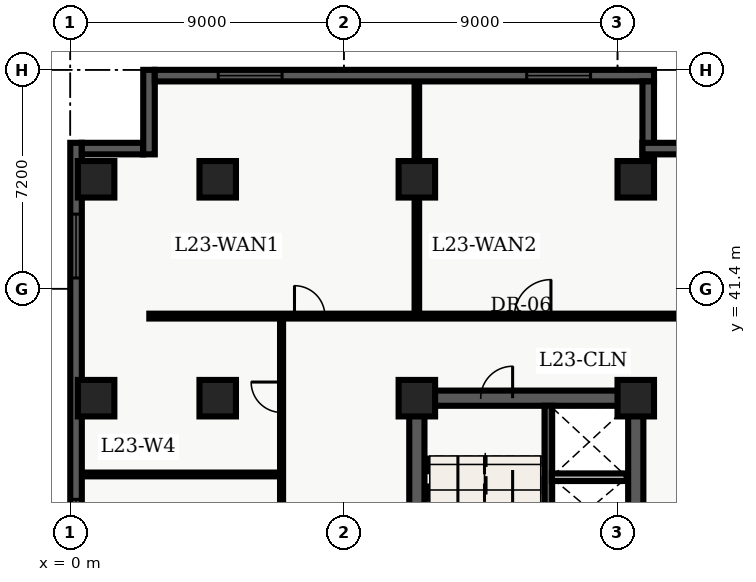
"""IFC4 building model, lengths in metres.
Left out: names, types, materials, properties, quantities, classifications, styles, units other than length and angle.
Written with IfcOpenShell. Run it as: python <this file> out.ifc"""

import sys

from ifc_helpers import new_model, entity, si_unit, converted_unit, direction, frame, origin_with_axes, origin_2d_with_axis, place, context, subcontext, project, spatial, polyline, rectangle, outline, extrude, element, fill, save


model = new_model("IFC4")
c1 = context("Model", 3, precision=1e-05, world=origin_with_axes(), true_north=direction((0.0, 1.0)))
c2 = subcontext(c1, "Body", "Model", "MODEL_VIEW")
j1 = project(units=[si_unit("LENGTHUNIT", "METRE"), converted_unit("PLANEANGLEUNIT", "DEGREE", entity("IfcPlaneAngleMeasure", 0.017), si_unit("PLANEANGLEUNIT", "RADIAN"), dimensions=[0, 0, 0, 0, 0, 0, 0])], contexts=[c1])
p1 = place(None, origin_with_axes())
s1 = spatial("IfcSite", under=j1, at=p1, CompositionType="ELEMENT")
p2 = place(p1, origin_with_axes())
s2 = spatial("IfcBuilding", under=s1, at=p2, CompositionType="ELEMENT")
p3 = place(p2, frame((0.0, 0.0, 96.9), z_axis=(0.0, 0.0, 1.0), x_axis=(1.0, 0.0, 0.0)))
s3 = spatial("IfcBuildingStorey", under=s2, at=p3, CompositionType="ELEMENT", Elevation=96.9)
p4 = place(p3, frame((11.4, 10.8, 0.0), z_axis=(0.0, 0.0, 1.0), x_axis=(0.0, 1.0, 0.0)))
e1 = element("IfcWall", 1, at=p4, inside=s3, PredefinedType="SHEAR", context=c2, shape_type="SweptSolid", body=[
    extrude(outline(polyline([(0.0, -0.25), (27.0, -0.25), (27.0, 0.25), (0.0, 0.25), (0.0, -0.25)])), origin_with_axes(), (0.0, 0.0, 1.0), 3.66),
])
p5 = place(p3, frame((11.4, 37.8, 0.0), z_axis=(0.0, 0.0, 1.0), x_axis=(1.0, 0.0, 0.0)))
e2 = element("IfcWall", 2, at=p5, inside=s3, PredefinedType="SHEAR", context=c2, shape_type="SweptSolid", body=[
    extrude(outline(polyline([(0.0, -0.25), (7.2, -0.25), (7.2, 0.25), (0.0, 0.25), (0.0, -0.25)])), origin_with_axes(), (0.0, 0.0, 1.0), 3.66),
])
p6 = place(p5, frame((2.625, 0.0, 0.0), z_axis=(0.0, 0.0, 1.0), x_axis=(1.0, 0.0, 0.0)))
e3 = element("IfcOpeningElement", 3, at=p6, cuts=e2, PredefinedType="OPENING", context=c2, shape_type="SweptSolid", body=[
    extrude(rectangle(XDim=1.05, YDim=0.52, at=origin_2d_with_axis()), origin_with_axes(), (0.0, 0.0, 1.0), 2.15),
])
p7 = place(p3, frame((18.6, 24.3, 0.0), z_axis=(0.0, 0.0, 1.0), x_axis=(0.0, 1.0, 0.0)))
e4 = element("IfcWall", 4, at=p7, inside=s3, PredefinedType="SHEAR", context=c2, shape_type="SweptSolid", body=[
    extrude(outline(polyline([(0.0, -0.25), (13.5, -0.25), (13.5, 0.25), (0.0, 0.25), (0.0, -0.25)])), origin_with_axes(), (0.0, 0.0, 1.0), 3.66),
])
p8 = place(p7, frame((6.025, 0.0, 0.0), z_axis=(0.0, 0.0, 1.0), x_axis=(1.0, 0.0, 0.0)))
e5 = element("IfcOpeningElement", 5, at=p8, cuts=e4, PredefinedType="OPENING", context=c2, shape_type="SweptSolid", body=[
    extrude(rectangle(XDim=0.95, YDim=0.52, at=origin_2d_with_axis()), origin_with_axes(), (0.0, 0.0, 1.0), 2.15),
])
p9 = place(p7, frame((7.825, 0.0, 0.0), z_axis=(0.0, 0.0, 1.0), x_axis=(1.0, 0.0, 0.0)))
e6 = element("IfcOpeningElement", 6, at=p9, cuts=e4, PredefinedType="OPENING", context=c2, shape_type="SweptSolid", body=[
    extrude(rectangle(XDim=0.95, YDim=0.52, at=origin_2d_with_axis()), origin_with_axes(), (0.0, 0.0, 1.0), 2.15),
])
p10 = place(p3, frame((15.725, 28.9, 0.0), z_axis=(0.0, 0.0, 1.0), x_axis=(0.0, 1.0, 0.0)))
e7 = element("IfcWall", 7, at=p10, inside=s3, PredefinedType="SHEAR", context=c2, shape_type="SweptSolid", body=[
    extrude(outline(polyline([(0.0, -0.125), (8.65, -0.125), (8.65, 0.125), (0.0, 0.125), (0.0, -0.125)])), origin_with_axes(), (0.0, 0.0, 1.0), 3.66),
])
for number, where, z_axis, x_axis in (
    (8, (11.4, 37.8, 0.0), (0.0, 0.0, 1.0), (1.0, 0.0, 0.0)),
    (9, (11.4, 45.0, 0.0), (0.0, 0.0, 1.0), (1.0, 0.0, 0.0)),
    (10, (18.6, 37.8, 0.0), (0.0, 0.0, 1.0), (1.0, 0.0, 0.0)),
    (11, (18.6, 45.0, 0.0), (0.0, 0.0, 1.0), (1.0, 0.0, 0.0)),
    (12, (4.85, 37.8, 0.0), (0.0, 0.0, 1.0), (1.0, 0.0, 0.0)),
    (13, (4.85, 45.0, 0.0), (0.0, 0.0, 1.0), (1.0, 0.0, 0.0)),
    (14, (0.85, 37.8, 0.0), (0.0, 0.0, 1.0), (1.0, 0.0, 0.0)),
    (15, (0.85, 45.0, 0.0), (0.0, 0.0, 1.0), (1.0, 0.0, 0.0)),
):
    element("IfcColumn", number, at=place(p3, frame(where, z_axis=z_axis, x_axis=x_axis)), inside=s3, PredefinedType="COLUMN", context=c2, shape_type="SweptSolid", body=[
        extrude(rectangle(XDim=1.2, YDim=1.2, at=origin_2d_with_axis()), origin_with_axes(), (0.0, 0.0, 1.0), 3.9),
    ])
p11 = place(p3, frame((15.84, 35.2, 0.0), z_axis=(0.0, 0.0, 1.0), x_axis=(1.0, 0.0, 0.0)))
e16 = element("IfcWall", 16, at=p11, inside=s3, PredefinedType="SOLIDWALL", context=c2, shape_type="SweptSolid", body=[
    extrude(outline(polyline([(0.0, -0.125), (2.46, -0.125), (2.46, 0.125), (0.0, 0.125), (0.0, -0.125)])), origin_with_axes(), (0.0, 0.0, 1.0), 2.7),
])
p12 = place(p3, frame((2.6, 40.5, 0.0), z_axis=(0.0, 0.0, 1.0), x_axis=(1.0, 0.0, 0.0)))
e17 = element("IfcWall", 17, at=p12, inside=s3, PredefinedType="PARTITIONING", context=c2, shape_type="SweptSolid", body=[
    extrude(outline(polyline([(0.0, -0.08), (18.65, -0.08), (18.65, 0.08), (0.0, 0.08), (0.0, -0.08)])), origin_with_axes(), (0.0, 0.0, 1.0), 2.7),
])
p13 = place(p12, frame((5.275, 0.0, 0.0), z_axis=(0.0, 0.0, 1.0), x_axis=(1.0, 0.0, 0.0)))
e18 = element("IfcOpeningElement", 18, at=p13, cuts=e17, PredefinedType="OPENING", context=c2, shape_type="SweptSolid", body=[
    extrude(rectangle(XDim=1.0, YDim=0.18, at=origin_2d_with_axis()), origin_with_axes(), (0.0, 0.0, 1.0), 2.15),
])
p14 = place(p12, frame((12.61, 0.0, 0.0), z_axis=(0.0, 0.0, 1.0), x_axis=(1.0, 0.0, 0.0)))
e19 = element("IfcOpeningElement", 19, at=p14, cuts=e17, PredefinedType="OPENING", context=c2, shape_type="SweptSolid", body=[
    extrude(rectangle(XDim=1.2, YDim=0.18, at=origin_2d_with_axis()), origin_with_axes(), (0.0, 0.0, 1.0), 2.2),
])
p15 = place(p3, frame((6.95, 7.8, 0.0), z_axis=(0.0, 0.0, 1.0), x_axis=(0.0, 1.0, 0.0)))
e20 = element("IfcWall", 20, at=p15, inside=s3, PredefinedType="PARTITIONING", context=c2, shape_type="SweptSolid", body=[
    extrude(outline(polyline([(0.0, -0.05), (32.7, -0.05), (32.7, 0.05), (0.0, 0.05), (0.0, -0.05)])), origin_with_axes(), (0.0, 0.0, 1.0), 2.7),
])
p16 = place(p15, frame((3.707, 0.0, 0.0), z_axis=(0.0, 0.0, 1.0), x_axis=(1.0, 0.0, 0.0)))
e21 = element("IfcOpeningElement", 21, at=p16, cuts=e20, PredefinedType="OPENING", context=c2, shape_type="SweptSolid", body=[
    extrude(rectangle(XDim=1.0, YDim=0.12, at=origin_2d_with_axis()), origin_with_axes(), (0.0, 0.0, 1.0), 2.15),
])
p17 = place(p15, frame((11.836, 0.0, 0.0), z_axis=(0.0, 0.0, 1.0), x_axis=(1.0, 0.0, 0.0)))
e22 = element("IfcOpeningElement", 22, at=p17, cuts=e20, PredefinedType="OPENING", context=c2, shape_type="SweptSolid", body=[
    extrude(rectangle(XDim=1.0, YDim=0.12, at=origin_2d_with_axis()), origin_with_axes(), (0.0, 0.0, 1.0), 2.15),
])
p18 = place(p15, frame((21.94, 0.0, 0.0), z_axis=(0.0, 0.0, 1.0), x_axis=(1.0, 0.0, 0.0)))
e23 = element("IfcOpeningElement", 23, at=p18, cuts=e20, PredefinedType="OPENING", context=c2, shape_type="SweptSolid", body=[
    extrude(rectangle(XDim=1.0, YDim=0.12, at=origin_2d_with_axis()), origin_with_axes(), (0.0, 0.0, 1.0), 2.15),
])
p19 = place(p15, frame((30.03, 0.0, 0.0), z_axis=(0.0, 0.0, 1.0), x_axis=(1.0, 0.0, 0.0)))
e24 = element("IfcOpeningElement", 24, at=p19, cuts=e20, PredefinedType="OPENING", context=c2, shape_type="SweptSolid", body=[
    extrude(rectangle(XDim=1.0, YDim=0.12, at=origin_2d_with_axis()), origin_with_axes(), (0.0, 0.0, 1.0), 2.15),
])
p20 = place(p3, frame((0.375, 35.291, 0.0), z_axis=(0.0, 0.0, 1.0), x_axis=(1.0, 0.0, 0.0)))
e25 = element("IfcWall", 25, at=p20, inside=s3, PredefinedType="PARTITIONING", context=c2, shape_type="SweptSolid", body=[
    extrude(outline(polyline([(0.0, -0.062), (6.455, -0.062), (6.455, 0.062), (0.0, 0.062), (0.0, -0.062)])), origin_with_axes(), (0.0, 0.0, 1.0), 2.7),
])
p21 = place(p3, frame((11.4, 40.6, 0.0), z_axis=(0.0, 0.0, 1.0), x_axis=(0.0, 1.0, 0.0)))
e26 = element("IfcWall", 26, at=p21, inside=s3, PredefinedType="PARTITIONING", context=c2, shape_type="SweptSolid", body=[
    extrude(outline(polyline([(0.0, -0.075), (7.64, -0.075), (7.64, 0.075), (0.0, 0.075), (0.0, -0.075)])), origin_with_axes(), (0.0, 0.0, 1.0), 2.7),
])
p22 = place(p3, frame((0.19, 2.78, 0.0), z_axis=(0.0, 0.0, 1.0), x_axis=(0.0, 1.0, 0.0)))
e27 = element("IfcWall", 27, at=p22, inside=s3, PredefinedType="SOLIDWALL", context=c2, shape_type="SweptSolid", body=[
    extrude(outline(polyline([(0.0, -0.19), (43.42, -0.19), (43.42, 0.19), (0.0, 0.19), (0.0, -0.19)])), origin_with_axes(), (0.0, 0.0, 1.0), 3.66),
])
p23 = place(p22, frame((2.946, 0.0, 0.45), z_axis=(0.0, 0.0, 1.0), x_axis=(1.0, 0.0, 0.0)))
e28 = element("IfcOpeningElement", 28, at=p23, cuts=e27, PredefinedType="OPENING", context=c2, shape_type="SweptSolid", body=[
    extrude(rectangle(XDim=2.1, YDim=0.4, at=origin_2d_with_axis()), origin_with_axes(), (0.0, 0.0, 1.0), 2.2),
])
p24 = place(p22, frame((17.469, 0.0, 0.45), z_axis=(0.0, 0.0, 1.0), x_axis=(1.0, 0.0, 0.0)))
e29 = element("IfcOpeningElement", 29, at=p24, cuts=e27, PredefinedType="OPENING", context=c2, shape_type="SweptSolid", body=[
    extrude(rectangle(XDim=2.1, YDim=0.4, at=origin_2d_with_axis()), origin_with_axes(), (0.0, 0.0, 1.0), 2.2),
])
p25 = place(p22, frame((26.401, 0.0, 0.45), z_axis=(0.0, 0.0, 1.0), x_axis=(1.0, 0.0, 0.0)))
e30 = element("IfcOpeningElement", 30, at=p25, cuts=e27, PredefinedType="OPENING", context=c2, shape_type="SweptSolid", body=[
    extrude(rectangle(XDim=2.1, YDim=0.4, at=origin_2d_with_axis()), origin_with_axes(), (0.0, 0.0, 1.0), 2.2),
])
p26 = place(p22, frame((30.642, 0.0, 0.45), z_axis=(0.0, 0.0, 1.0), x_axis=(1.0, 0.0, 0.0)))
e31 = element("IfcOpeningElement", 31, at=p26, cuts=e27, PredefinedType="OPENING", context=c2, shape_type="SweptSolid", body=[
    extrude(rectangle(XDim=2.1, YDim=0.4, at=origin_2d_with_axis()), origin_with_axes(), (0.0, 0.0, 1.0), 2.2),
])
p27 = place(p22, frame((40.024, 0.0, 0.45), z_axis=(0.0, 0.0, 1.0), x_axis=(1.0, 0.0, 0.0)))
e32 = element("IfcOpeningElement", 32, at=p27, cuts=e27, PredefinedType="OPENING", context=c2, shape_type="SweptSolid", body=[
    extrude(rectangle(XDim=2.1, YDim=0.4, at=origin_2d_with_axis()), origin_with_axes(), (0.0, 0.0, 1.0), 2.2),
])
p28 = place(p3, frame((0.38, 46.01, 0.0), z_axis=(0.0, 0.0, 1.0), x_axis=(1.0, 0.0, 0.0)))
e33 = element("IfcWall", 33, at=p28, inside=s3, PredefinedType="SOLIDWALL", context=c2, shape_type="SweptSolid", body=[
    extrude(outline(polyline([(0.0, -0.19), (2.02, -0.19), (2.02, 0.19), (0.0, 0.19), (0.0, -0.19)])), origin_with_axes(), (0.0, 0.0, 1.0), 3.66),
])
p29 = place(p3, frame((2.59, 45.82, 0.0), z_axis=(0.0, 0.0, 1.0), x_axis=(0.0, 1.0, 0.0)))
e34 = element("IfcWall", 34, at=p29, inside=s3, PredefinedType="SOLIDWALL", context=c2, shape_type="SweptSolid", body=[
    extrude(outline(polyline([(0.0, -0.19), (2.78, -0.19), (2.78, 0.19), (0.0, 0.19), (0.0, -0.19)])), origin_with_axes(), (0.0, 0.0, 1.0), 3.66),
])
p30 = place(p3, frame((2.78, 48.41, 0.0), z_axis=(0.0, 0.0, 1.0), x_axis=(1.0, 0.0, 0.0)))
e35 = element("IfcWall", 35, at=p30, inside=s3, PredefinedType="SOLIDWALL", context=c2, shape_type="SweptSolid", body=[
    extrude(outline(polyline([(0.0, -0.19), (16.42, -0.19), (16.42, 0.19), (0.0, 0.19), (0.0, -0.19)])), origin_with_axes(), (0.0, 0.0, 1.0), 3.66),
])
p31 = place(p30, frame((3.137, 0.0, 0.45), z_axis=(0.0, 0.0, 1.0), x_axis=(1.0, 0.0, 0.0)))
e36 = element("IfcOpeningElement", 36, at=p31, cuts=e35, PredefinedType="OPENING", context=c2, shape_type="SweptSolid", body=[
    extrude(rectangle(XDim=2.1, YDim=0.4, at=origin_2d_with_axis()), origin_with_axes(), (0.0, 0.0, 1.0), 2.2),
])
p32 = place(p30, frame((13.283, 0.0, 0.45), z_axis=(0.0, 0.0, 1.0), x_axis=(1.0, 0.0, 0.0)))
e37 = element("IfcOpeningElement", 37, at=p32, cuts=e35, PredefinedType="OPENING", context=c2, shape_type="SweptSolid", body=[
    extrude(rectangle(XDim=2.1, YDim=0.4, at=origin_2d_with_axis()), origin_with_axes(), (0.0, 0.0, 1.0), 2.2),
])
p33 = place(p3, frame((19.01, 48.22, 0.0), z_axis=(0.0, 0.0, 1.0), x_axis=(0.0, -1.0, 0.0)))
e38 = element("IfcWall", 38, at=p33, inside=s3, PredefinedType="SOLIDWALL", context=c2, shape_type="SweptSolid", body=[
    extrude(outline(polyline([(0.0, -0.19), (2.56, -0.19), (2.56, 0.19), (0.0, 0.19), (0.0, -0.19)])), origin_with_axes(), (0.0, 0.0, 1.0), 3.66),
])
p34 = place(p3, frame((18.82, 46.01, 0.0), z_axis=(0.0, 0.0, 1.0), x_axis=(1.0, 0.0, 0.0)))
e39 = element("IfcWall", 39, at=p34, inside=s3, PredefinedType="SOLIDWALL", context=c2, shape_type="SweptSolid", body=[
    extrude(outline(polyline([(0.0, -0.19), (2.78, -0.19), (2.78, 0.19), (0.0, 0.19), (0.0, -0.19)])), origin_with_axes(), (0.0, 0.0, 1.0), 3.66),
])
p35 = place(p5, frame((2.625, 0.0, 0.0), z_axis=(0.0, 0.0, 1.0), x_axis=(1.0, 0.0, 0.0)))
e40 = element("IfcDoor", 40, at=p35, inside=s3, OperationType="SINGLE_SWING_RIGHT", PredefinedType="DOOR", context=c2, shape_type="SweptSolid", body=[
    extrude(rectangle(XDim=1.05, YDim=0.09, at=origin_2d_with_axis()), origin_with_axes(), (0.0, 0.0, 1.0), 2.15),
])
fill(e3, e40)
p36 = place(p15, frame((30.03, 0.0, 0.0), z_axis=(0.0, 0.0, 1.0), x_axis=(1.0, 0.0, 0.0)))
e41 = element("IfcDoor", 41, at=p36, inside=s3, OperationType="SINGLE_SWING_RIGHT", PredefinedType="DOOR", context=c2, shape_type="SweptSolid", body=[
    extrude(rectangle(XDim=1.0, YDim=0.06, at=origin_2d_with_axis()), origin_with_axes(), (0.0, 0.0, 1.0), 2.15),
])
fill(e24, e41)
p37 = place(p12, frame((5.275, 0.0, 0.0), z_axis=(0.0, 0.0, 1.0), x_axis=(1.0, 0.0, 0.0)))
e42 = element("IfcDoor", 42, at=p37, inside=s3, OperationType="SINGLE_SWING_LEFT", PredefinedType="DOOR", context=c2, shape_type="SweptSolid", body=[
    extrude(rectangle(XDim=1.0, YDim=0.09, at=origin_2d_with_axis()), origin_with_axes(), (0.0, 0.0, 1.0), 2.15),
])
fill(e18, e42)
p38 = place(p12, frame((12.61, 0.0, 0.0), z_axis=(0.0, 0.0, 1.0), x_axis=(1.0, 0.0, 0.0)))
e43 = element("IfcDoor", 43, at=p38, inside=s3, OperationType="SINGLE_SWING_RIGHT", PredefinedType="DOOR", context=c2, shape_type="SweptSolid", body=[
    extrude(rectangle(XDim=1.2, YDim=0.09, at=origin_2d_with_axis()), origin_with_axes(), (0.0, 0.0, 1.0), 2.2),
])
fill(e19, e43)
p39 = place(p22, frame((30.642, 0.0, 0.45), z_axis=(0.0, 0.0, 1.0), x_axis=(1.0, 0.0, 0.0)))
e44 = element("IfcWindow", 44, at=p39, inside=s3, PredefinedType="WINDOW", context=c2, shape_type="SweptSolid", body=[
    extrude(rectangle(XDim=2.1, YDim=0.09, at=origin_2d_with_axis()), origin_with_axes(), (0.0, 0.0, 1.0), 2.2),
])
fill(e31, e44)
p40 = place(p22, frame((40.024, 0.0, 0.45), z_axis=(0.0, 0.0, 1.0), x_axis=(1.0, 0.0, 0.0)))
e45 = element("IfcWindow", 45, at=p40, inside=s3, PredefinedType="WINDOW", context=c2, shape_type="SweptSolid", body=[
    extrude(rectangle(XDim=2.1, YDim=0.09, at=origin_2d_with_axis()), origin_with_axes(), (0.0, 0.0, 1.0), 2.2),
])
fill(e32, e45)
p41 = place(p30, frame((3.137, 0.0, 0.45), z_axis=(0.0, 0.0, 1.0), x_axis=(1.0, 0.0, 0.0)))
e46 = element("IfcWindow", 46, at=p41, inside=s3, PredefinedType="WINDOW", context=c2, shape_type="SweptSolid", body=[
    extrude(rectangle(XDim=2.1, YDim=0.09, at=origin_2d_with_axis()), origin_with_axes(), (0.0, 0.0, 1.0), 2.2),
])
fill(e36, e46)
p42 = place(p30, frame((13.283, 0.0, 0.45), z_axis=(0.0, 0.0, 1.0), x_axis=(1.0, 0.0, 0.0)))
e47 = element("IfcWindow", 47, at=p42, inside=s3, PredefinedType="WINDOW", context=c2, shape_type="SweptSolid", body=[
    extrude(rectangle(XDim=2.1, YDim=0.09, at=origin_2d_with_axis()), origin_with_axes(), (0.0, 0.0, 1.0), 2.2),
])
fill(e37, e47)
save(model, sys.argv[1])
